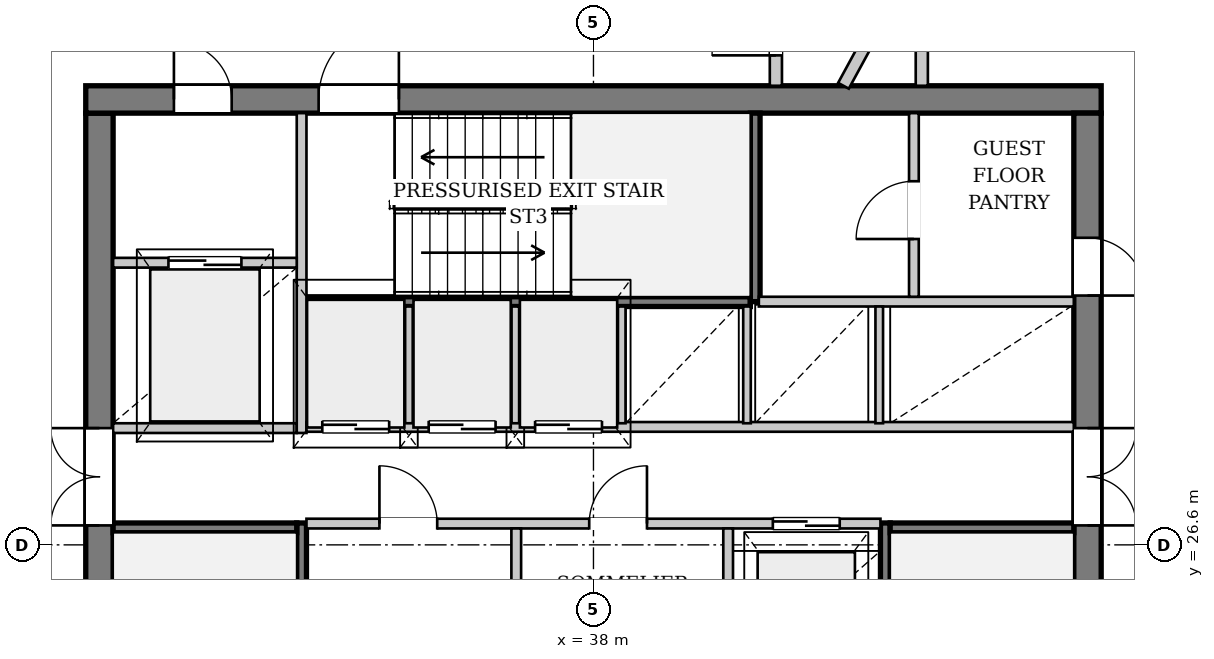
"""IFC4 building model, lengths in metres.
Left out: names, types, materials, properties, quantities, classifications, styles, units other than length and angle.
Written with IfcOpenShell. Run it as: python <this file> out.ifc"""

import sys

from ifc_helpers import new_model, si_unit, direction, frame, frame_2d, origin, place, context, subcontext, project, spatial, rectangle, extrude, source, transform, mapped, element, fill, save


model = new_model("IFC4")
c1 = context("Model", 3, precision=1e-05, world=origin(), true_north=direction((0.0, 1.0)))
c2 = subcontext(c1, "Body", "Model", "MODEL_VIEW")
j1 = project(units=[si_unit("LENGTHUNIT", "METRE"), si_unit("PLANEANGLEUNIT", "RADIAN")], contexts=[c1])
p1 = place(None, origin())
s1 = spatial("IfcSite", under=j1, at=p1, CompositionType="ELEMENT")
p2 = place(p1, origin())
s2 = spatial("IfcBuilding", under=s1, at=p2, CompositionType="ELEMENT")
p3 = place(p2, frame((0.0, 0.0, 245.3)))
s3 = spatial("IfcBuildingStorey", under=s2, at=p3, CompositionType="ELEMENT", Elevation=245.3)
p4 = place(p3, frame((15.593, 28.735, 0.0), z_axis=(0.0, 0.0, 1.0), x_axis=(0.841061212788, 0.54093995632, 0.0)))
e1 = element("IfcWall", 1, at=p4, inside=s3, PredefinedType="SOLIDWALL", context=c2, shape_type="SweptSolid", body=[
    extrude(rectangle(XDim=22.124, YDim=0.38, at=frame_2d((11.062, 0.0))), origin(), (0.0, 0.0, 1.0), 2.872),
])
p5 = place(p4, frame((5.595, 0.0, 0.65)))
e2 = element("IfcOpeningElement", 2, at=p5, cuts=e1, PredefinedType="OPENING", context=c2, shape_type="SweptSolid", body=[
    extrude(rectangle(XDim=1.2, YDim=1.5, at=frame_2d((0.6, 0.75))), frame((0.0, 0.2, 0.0), z_axis=(0.0, -1.0, 0.0), x_axis=(1.0, 0.0, 0.0)), (0.0, 0.0, 1.0), 0.4),
])
p6 = place(p4, frame((16.929, 0.0, 0.65)))
e3 = element("IfcOpeningElement", 3, at=p6, cuts=e1, PredefinedType="OPENING", context=c2, shape_type="SweptSolid", body=[
    extrude(rectangle(XDim=1.2, YDim=1.5, at=frame_2d((0.6, 0.75))), frame((0.0, 0.2, 0.0), z_axis=(0.0, -1.0, 0.0), x_axis=(1.0, 0.0, 0.0)), (0.0, 0.0, 1.0), 0.4),
])
p7 = place(p3, frame((29.875, 19.5, 0.0), z_axis=(0.0, 0.0, 1.0), x_axis=(0.0, 1.0, 0.0)))
e4 = element("IfcWall", 4, at=p7, inside=s3, PredefinedType="SHEAR", context=c2, shape_type="SweptSolid", body=[
    extrude(rectangle(XDim=14.2, YDim=0.45, at=frame_2d((7.1, 0.0))), origin(), (0.0, 0.0, 1.0), 3.38),
])
p8 = place(p7, frame((7.42, 0.0, 0.0)))
e5 = element("IfcOpeningElement", 5, at=p8, cuts=e4, PredefinedType="OPENING", context=c2, shape_type="SweptSolid", body=[
    extrude(rectangle(XDim=1.6, YDim=2.2, at=frame_2d((0.8, 1.1))), frame((0.0, 0.235, 0.0), z_axis=(0.0, -1.0, 0.0), x_axis=(1.0, 0.0, 0.0)), (0.0, 0.0, 1.0), 0.47),
])
p9 = place(p3, frame((29.65, 33.925, 0.0), z_axis=(0.0, 0.0, 1.0), x_axis=(1.0, 0.0, 0.0)))
e6 = element("IfcWall", 6, at=p9, inside=s3, PredefinedType="SHEAR", context=c2, shape_type="SweptSolid", body=[
    extrude(rectangle(XDim=16.7, YDim=0.45, at=frame_2d((8.35, 0.0))), origin(), (0.0, 0.0, 1.0), 3.38),
])
p10 = place(p9, frame((1.45, 0.0, 0.0)))
e7 = element("IfcOpeningElement", 7, at=p10, cuts=e6, PredefinedType="OPENING", context=c2, shape_type="SweptSolid", body=[
    extrude(rectangle(XDim=0.95, YDim=2.1, at=frame_2d((0.475, 1.05))), frame((0.0, 0.235, 0.0), z_axis=(0.0, -1.0, 0.0), x_axis=(1.0, 0.0, 0.0)), (0.0, 0.0, 1.0), 0.47),
])
p11 = place(p9, frame((3.83, 0.0, 0.0)))
e8 = element("IfcOpeningElement", 8, at=p11, cuts=e6, PredefinedType="OPENING", context=c2, shape_type="SweptSolid", body=[
    extrude(rectangle(XDim=1.32, YDim=2.2, at=frame_2d((0.66, 1.1))), frame((0.0, 0.235, 0.0), z_axis=(0.0, -1.0, 0.0), x_axis=(1.0, 0.0, 0.0)), (0.0, 0.0, 1.0), 0.47),
])
p12 = place(p3, frame((46.125, 33.7, 0.0), z_axis=(0.0, 0.0, 1.0), x_axis=(0.0, -1.0, 0.0)))
e9 = element("IfcWall", 9, at=p12, inside=s3, PredefinedType="SHEAR", context=c2, shape_type="SweptSolid", body=[
    extrude(rectangle(XDim=14.2, YDim=0.45, at=frame_2d((7.1, 0.0))), origin(), (0.0, 0.0, 1.0), 3.38),
])
p13 = place(p12, frame((5.18, 0.0, 0.0)))
e10 = element("IfcOpeningElement", 10, at=p13, cuts=e9, PredefinedType="OPENING", context=c2, shape_type="SweptSolid", body=[
    extrude(rectangle(XDim=1.6, YDim=2.2, at=frame_2d((0.8, 1.1))), frame((0.0, 0.235, 0.0), z_axis=(0.0, -1.0, 0.0), x_axis=(1.0, 0.0, 0.0)), (0.0, 0.0, 1.0), 0.47),
])
p14 = place(p12, frame((2.05, 0.0, 0.0)))
e11 = element("IfcOpeningElement", 11, at=p14, cuts=e9, PredefinedType="OPENING", context=c2, shape_type="SweptSolid", body=[
    extrude(rectangle(XDim=0.95, YDim=2.1, at=frame_2d((0.475, 1.05))), frame((0.0, 0.235, 0.0), z_axis=(0.0, -1.0, 0.0), x_axis=(1.0, 0.0, 0.0)), (0.0, 0.0, 1.0), 0.47),
])
p15 = place(p3, frame((33.2, 19.5, 0.0), z_axis=(0.0, 0.0, 1.0), x_axis=(0.0, 1.0, 0.0)))
e12 = element("IfcWall", 12, at=p15, inside=s3, PredefinedType="PARTITIONING", context=c2, shape_type="SweptSolid", body=[
    extrude(rectangle(XDim=7.46, YDim=0.16, at=frame_2d((3.73, 0.0))), origin(), (0.0, 0.0, 1.0), 3.38),
])
p16 = place(p15, frame((0.08, 0.0, 0.0)))
e13 = element("IfcOpeningElement", 13, at=p16, cuts=e12, PredefinedType="OPENING", context=c2, shape_type="SweptSolid", body=[
    extrude(rectangle(XDim=1.32, YDim=2.2, at=frame_2d((0.66, 1.1))), frame((0.0, 0.09, 0.0), z_axis=(0.0, -1.0, 0.0), x_axis=(1.0, 0.0, 0.0)), (0.0, 0.0, 1.0), 0.18),
])
p17 = place(p3, frame((30.1, 26.88, 0.0), z_axis=(0.0, 0.0, 1.0), x_axis=(1.0, 0.0, 0.0)))
e14 = element("IfcWall", 14, at=p17, inside=s3, PredefinedType="PARTITIONING", context=c2, shape_type="SweptSolid", body=[
    extrude(rectangle(XDim=3.02, YDim=0.16, at=frame_2d((1.51, 0.0))), origin(), (0.0, 0.0, 1.0), 3.38),
])
p18 = place(p3, frame((42.8, 26.96, 0.0), z_axis=(0.0, 0.0, 1.0), x_axis=(0.0, -1.0, 0.0)))
e15 = element("IfcWall", 15, at=p18, inside=s3, PredefinedType="PARTITIONING", context=c2, shape_type="SweptSolid", body=[
    extrude(rectangle(XDim=7.46, YDim=0.16, at=frame_2d((3.73, 0.0))), origin(), (0.0, 0.0, 1.0), 3.38),
])
p19 = place(p18, frame((6.06, 0.0, 0.0)))
e16 = element("IfcOpeningElement", 16, at=p19, cuts=e15, PredefinedType="OPENING", context=c2, shape_type="SweptSolid", body=[
    extrude(rectangle(XDim=1.32, YDim=2.2, at=frame_2d((0.66, 1.1))), frame((0.0, 0.09, 0.0), z_axis=(0.0, -1.0, 0.0), x_axis=(1.0, 0.0, 0.0)), (0.0, 0.0, 1.0), 0.18),
])
p20 = place(p3, frame((42.88, 26.88, 0.0), z_axis=(0.0, 0.0, 1.0), x_axis=(1.0, 0.0, 0.0)))
e17 = element("IfcWall", 17, at=p20, inside=s3, PredefinedType="PARTITIONING", context=c2, shape_type="SweptSolid", body=[
    extrude(rectangle(XDim=3.02, YDim=0.16, at=frame_2d((1.51, 0.0))), origin(), (0.0, 0.0, 1.0), 3.38),
])
p21 = place(p3, frame((33.28, 30.6, 0.0), z_axis=(0.0, 0.0, 1.0), x_axis=(1.0, 0.0, 0.0)))
e18 = element("IfcWall", 18, at=p21, inside=s3, PredefinedType="PARTITIONING", context=c2, shape_type="SweptSolid", body=[
    extrude(rectangle(XDim=7.3, YDim=0.16, at=frame_2d((3.65, 0.0))), origin(), (0.0, 0.0, 1.0), 3.38),
])
p22 = place(p3, frame((40.66, 30.6, 0.0), z_axis=(0.0, 0.0, 1.0), x_axis=(0.0, 1.0, 0.0)))
e19 = element("IfcWall", 19, at=p22, inside=s3, PredefinedType="PARTITIONING", context=c2, shape_type="SweptSolid", body=[
    extrude(rectangle(XDim=3.1, YDim=0.16, at=frame_2d((1.55, 0.0))), origin(), (0.0, 0.0, 1.0), 3.38),
])
p23 = place(p3, frame((30.1, 28.52, 0.0), z_axis=(0.0, 0.0, 1.0), x_axis=(1.0, 0.0, 0.0)))
e20 = element("IfcWall", 20, at=p23, inside=s3, PredefinedType="PARTITIONING", context=c2, shape_type="SweptSolid", body=[
    extrude(rectangle(XDim=3.02, YDim=0.16, at=frame_2d((1.51, 0.0))), origin(), (0.0, 0.0, 1.0), 3.38),
])
p24 = place(p3, frame((33.2, 28.44, 0.0), z_axis=(0.0, 0.0, 1.0), x_axis=(0.0, 1.0, 0.0)))
e21 = element("IfcWall", 21, at=p24, inside=s3, PredefinedType="PARTITIONING", context=c2, shape_type="SweptSolid", body=[
    extrude(rectangle(XDim=5.26, YDim=0.16, at=frame_2d((2.63, 0.0))), origin(), (0.0, 0.0, 1.0), 3.38),
])
p25 = place(p3, frame((30.1, 31.24, 0.0), z_axis=(0.0, 0.0, 1.0), x_axis=(1.0, 0.0, 0.0)))
e22 = element("IfcWall", 22, at=p25, inside=s3, PredefinedType="PARTITIONING", context=c2, shape_type="SweptSolid", body=[
    extrude(rectangle(XDim=3.02, YDim=0.16, at=frame_2d((1.51, 0.0))), origin(), (0.0, 0.0, 1.0), 3.38),
])
p26 = place(p25, frame((0.91, 0.0, 0.0)))
e23 = element("IfcOpeningElement", 23, at=p26, cuts=e22, PredefinedType="OPENING", context=c2, shape_type="SweptSolid", body=[
    extrude(rectangle(XDim=1.2, YDim=2.2, at=frame_2d((0.6, 1.1))), frame((0.0, 0.09, 0.0), z_axis=(0.0, -1.0, 0.0), x_axis=(1.0, 0.0, 0.0)), (0.0, 0.0, 1.0), 0.18),
])
p27 = place(p3, frame((33.28, 26.95, 0.0), z_axis=(0.0, 0.0, 1.0), x_axis=(1.0, 0.0, 0.0)))
e24 = element("IfcWall", 24, at=p27, inside=s3, PredefinedType="PARTITIONING", context=c2, shape_type="SweptSolid", body=[
    extrude(rectangle(XDim=9.44, YDim=0.16, at=frame_2d((4.72, 0.0))), origin(), (0.0, 0.0, 1.0), 3.38),
])
p28 = place(p27, frame((1.2, 0.0, 0.0)))
e25 = element("IfcOpeningElement", 25, at=p28, cuts=e24, PredefinedType="OPENING", context=c2, shape_type="SweptSolid", body=[
    extrude(rectangle(XDim=0.95, YDim=2.1, at=frame_2d((0.475, 1.05))), frame((0.0, 0.09, 0.0), z_axis=(0.0, -1.0, 0.0), x_axis=(1.0, 0.0, 0.0)), (0.0, 0.0, 1.0), 0.18),
])
p29 = place(p27, frame((4.65, 0.0, 0.0)))
e26 = element("IfcOpeningElement", 26, at=p29, cuts=e24, PredefinedType="OPENING", context=c2, shape_type="SweptSolid", body=[
    extrude(rectangle(XDim=0.95, YDim=2.1, at=frame_2d((0.475, 1.05))), frame((0.0, 0.09, 0.0), z_axis=(0.0, -1.0, 0.0), x_axis=(1.0, 0.0, 0.0)), (0.0, 0.0, 1.0), 0.18),
])
p30 = place(p27, frame((7.67, 0.0, 0.0)))
e27 = element("IfcOpeningElement", 27, at=p30, cuts=e24, PredefinedType="OPENING", context=c2, shape_type="SweptSolid", body=[
    extrude(rectangle(XDim=1.1, YDim=2.2, at=frame_2d((0.55, 1.1))), frame((0.0, 0.09, 0.0), z_axis=(0.0, -1.0, 0.0), x_axis=(1.0, 0.0, 0.0)), (0.0, 0.0, 1.0), 0.18),
])
for number, where, z_axis, x_axis in (
    (28, (36.73, 24.56, 0.0), (0.0, 0.0, 1.0), (0.0, 1.0, 0.0)),
    (29, (40.215, 24.56, 0.0), (0.0, 0.0, 1.0), (0.0, 1.0, 0.0)),
):
    element("IfcWall", number, at=place(p3, frame(where, z_axis=z_axis, x_axis=x_axis)), inside=s3, PredefinedType="PARTITIONING", context=c2, shape_type="SweptSolid", body=[
        extrude(rectangle(XDim=2.31, YDim=0.16, at=frame_2d((1.155, 0.0))), origin(), (0.0, 0.0, 1.0), 3.38),
    ])
p31 = place(p3, frame((33.28, 28.54, 0.0), z_axis=(0.0, 0.0, 1.0), x_axis=(1.0, 0.0, 0.0)))
e30 = element("IfcWall", 30, at=p31, inside=s3, PredefinedType="PARTITIONING", context=c2, shape_type="SweptSolid", body=[
    extrude(rectangle(XDim=12.62, YDim=0.16, at=frame_2d((6.31, 0.0))), origin(), (0.0, 0.0, 1.0), 3.38),
])
p32 = place(p31, frame((0.26, 0.0, 0.0)))
e31 = element("IfcOpeningElement", 31, at=p32, cuts=e30, PredefinedType="OPENING", context=c2, shape_type="SweptSolid", body=[
    extrude(rectangle(XDim=1.1, YDim=2.2, at=frame_2d((0.55, 1.1))), frame((0.0, 0.09, 0.0), z_axis=(0.0, -1.0, 0.0), x_axis=(1.0, 0.0, 0.0)), (0.0, 0.0, 1.0), 0.18),
])
p33 = place(p31, frame((2.01, 0.0, 0.0)))
e32 = element("IfcOpeningElement", 32, at=p33, cuts=e30, PredefinedType="OPENING", context=c2, shape_type="SweptSolid", body=[
    extrude(rectangle(XDim=1.1, YDim=2.2, at=frame_2d((0.55, 1.1))), frame((0.0, 0.09, 0.0), z_axis=(0.0, -1.0, 0.0), x_axis=(1.0, 0.0, 0.0)), (0.0, 0.0, 1.0), 0.18),
])
p34 = place(p31, frame((3.76, 0.0, 0.0)))
e33 = element("IfcOpeningElement", 33, at=p34, cuts=e30, PredefinedType="OPENING", context=c2, shape_type="SweptSolid", body=[
    extrude(rectangle(XDim=1.1, YDim=2.2, at=frame_2d((0.55, 1.1))), frame((0.0, 0.09, 0.0), z_axis=(0.0, -1.0, 0.0), x_axis=(1.0, 0.0, 0.0)), (0.0, 0.0, 1.0), 0.18),
])
p35 = place(p3, frame((40.72, 30.6, 0.0), z_axis=(0.0, 0.0, 1.0), x_axis=(1.0, 0.0, 0.0)))
e34 = element("IfcWall", 34, at=p35, inside=s3, PredefinedType="PARTITIONING", context=c2, shape_type="SweptSolid", body=[
    extrude(rectangle(XDim=5.18, YDim=0.16, at=frame_2d((2.59, 0.0))), origin(), (0.0, 0.0, 1.0), 3.38),
])
for number, where, z_axis, x_axis in (
    (35, (34.965, 28.6, 0.0), (0.0, 0.0, 1.0), (0.0, 1.0, 0.0)),
    (36, (36.715, 28.6, 0.0), (0.0, 0.0, 1.0), (0.0, 1.0, 0.0)),
    (37, (38.465, 28.6, 0.0), (0.0, 0.0, 1.0), (0.0, 1.0, 0.0)),
    (38, (40.525, 28.6, 0.0), (0.0, 0.0, 1.0), (0.0, 1.0, 0.0)),
    (39, (42.7, 28.6, 0.0), (0.0, 0.0, 1.0), (0.0, 1.0, 0.0)),
):
    element("IfcWall", number, at=place(p3, frame(where, z_axis=z_axis, x_axis=x_axis)), inside=s3, PredefinedType="PARTITIONING", context=c2, shape_type="SweptSolid", body=[
        extrude(rectangle(XDim=1.92, YDim=0.125, at=frame_2d((0.96, 0.0))), origin(), (0.0, 0.0, 1.0), 3.38),
    ])
p36 = place(p3, frame((43.27, 30.68, 0.0), z_axis=(0.0, 0.0, 1.0), x_axis=(0.0, 1.0, 0.0)))
e40 = element("IfcWall", 40, at=p36, inside=s3, PredefinedType="PARTITIONING", context=c2, shape_type="SweptSolid", body=[
    extrude(rectangle(XDim=3.02, YDim=0.16, at=frame_2d((1.51, 0.0))), origin(), (0.0, 0.0, 1.0), 3.38),
])
p37 = place(p36, frame((0.95, 0.0, 0.0)))
e41 = element("IfcOpeningElement", 41, at=p37, cuts=e40, PredefinedType="OPENING", context=c2, shape_type="SweptSolid", body=[
    extrude(rectangle(XDim=0.95, YDim=2.1, at=frame_2d((0.475, 1.05))), frame((0.0, 0.09, 0.0), z_axis=(0.0, -1.0, 0.0), x_axis=(1.0, 0.0, 0.0)), (0.0, 0.0, 1.0), 0.18),
])
p38 = place(p3, frame((42.112, 34.15, 0.0), z_axis=(0.0, 0.0, 1.0), x_axis=(0.478252978847, 0.878222117817, 0.0)))
e42 = element("IfcWall", 42, at=p38, inside=s3, PredefinedType="PARTITIONING", context=c2, shape_type="SweptSolid", body=[
    extrude(rectangle(XDim=14.82, YDim=0.2, at=frame_2d((7.41, 0.0))), origin(), (0.0, 0.0, 1.0), 3.38),
])
p39 = place(p3, frame((41.0, 34.15, 0.0), z_axis=(0.0, 0.0, 1.0), x_axis=(0.0, 1.0, 0.0)))
e43 = element("IfcWall", 43, at=p39, inside=s3, PredefinedType="PARTITIONING", context=c2, shape_type="SweptSolid", body=[
    extrude(rectangle(XDim=1.85, YDim=0.2, at=frame_2d((0.925, 0.0))), origin(), (0.0, 0.0, 1.0), 3.38),
])
p40 = place(p39, frame((0.5, 0.0, 0.0)))
e44 = element("IfcOpeningElement", 44, at=p40, cuts=e43, PredefinedType="OPENING", context=c2, shape_type="SweptSolid", body=[
    extrude(rectangle(XDim=1.05, YDim=2.2, at=frame_2d((0.525, 1.1))), frame((0.0, 0.11, 0.0), z_axis=(0.0, -1.0, 0.0), x_axis=(1.0, 0.0, 0.0)), (0.0, 0.0, 1.0), 0.22),
])
p41 = place(p3, frame((43.4, 34.15, 0.0), z_axis=(0.0, 0.0, 1.0), x_axis=(0.0, 1.0, 0.0)))
e45 = element("IfcWall", 45, at=p41, inside=s3, PredefinedType="PARTITIONING", context=c2, shape_type="SweptSolid", body=[
    extrude(rectangle(XDim=1.85, YDim=0.2, at=frame_2d((0.925, 0.0))), origin(), (0.0, 0.0, 1.0), 3.38),
])
m1 = source(origin(), c2, "Body", "SweptSolid", [
    extrude(rectangle(XDim=1.6, YDim=2.2, at=frame_2d((0.8, 1.1))), frame((0.0, 0.025, 0.0), z_axis=(0.0, -1.0, 0.0), x_axis=(1.0, 0.0, 0.0)), (0.0, 0.0, 1.0), 0.05),
])
p42 = place(p8, origin())
e46 = element("IfcDoor", 46, at=p42, inside=s3, OperationType="DOUBLE_DOOR_SINGLE_SWING", PredefinedType="DOOR", context=c2, shape_type="MappedRepresentation", body=[
    mapped(m1, transform((0.0, 0.0, 0.0), x_axis=(1.0, 0.0, 0.0), y_axis=(0.0, 1.0, 0.0), z_axis=(0.0, 0.0, 1.0), scale=1.0)),
])
fill(e5, e46)
m2 = source(origin(), c2, "Body", "SweptSolid", [
    extrude(rectangle(XDim=0.95, YDim=2.1, at=frame_2d((0.475, 1.05))), frame((0.0, 0.025, 0.0), z_axis=(0.0, -1.0, 0.0), x_axis=(1.0, 0.0, 0.0)), (0.0, 0.0, 1.0), 0.05),
])
p43 = place(p10, origin())
e47 = element("IfcDoor", 47, at=p43, inside=s3, OperationType="SINGLE_SWING_LEFT", PredefinedType="DOOR", context=c2, shape_type="MappedRepresentation", body=[
    mapped(m2, transform((0.0, 0.0, 0.0), x_axis=(1.0, 0.0, 0.0), y_axis=(0.0, 1.0, 0.0), z_axis=(0.0, 0.0, 1.0), scale=1.0)),
])
fill(e7, e47)
m3 = source(origin(), c2, "Body", "SweptSolid", [
    extrude(rectangle(XDim=1.32, YDim=2.2, at=frame_2d((0.66, 1.1))), frame((0.0, 0.025, 0.0), z_axis=(0.0, -1.0, 0.0), x_axis=(1.0, 0.0, 0.0)), (0.0, 0.0, 1.0), 0.05),
])
p44 = place(p11, origin())
e48 = element("IfcDoor", 48, at=p44, inside=s3, OperationType="SINGLE_SWING_RIGHT", PredefinedType="DOOR", context=c2, shape_type="MappedRepresentation", body=[
    mapped(m3, transform((0.0, 0.0, 0.0), x_axis=(1.0, 0.0, 0.0), y_axis=(0.0, 1.0, 0.0), z_axis=(0.0, 0.0, 1.0), scale=1.0)),
])
fill(e8, e48)
p45 = place(p13, origin())
e49 = element("IfcDoor", 49, at=p45, inside=s3, OperationType="DOUBLE_DOOR_SINGLE_SWING", PredefinedType="DOOR", context=c2, shape_type="MappedRepresentation", body=[
    mapped(m1, transform((0.0, 0.0, 0.0), x_axis=(1.0, 0.0, 0.0), y_axis=(0.0, 1.0, 0.0), z_axis=(0.0, 0.0, 1.0), scale=1.0)),
])
fill(e10, e49)
m4 = source(origin(), c2, "Body", "SweptSolid", [
    extrude(rectangle(XDim=1.2, YDim=2.2, at=frame_2d((0.6, 1.1))), frame((0.0, 0.025, 0.0), z_axis=(0.0, -1.0, 0.0), x_axis=(1.0, 0.0, 0.0)), (0.0, 0.0, 1.0), 0.05),
])
p46 = place(p26, origin())
e50 = element("IfcDoor", 50, at=p46, inside=s3, OperationType="DOUBLE_DOOR_SLIDING", PredefinedType="DOOR", context=c2, shape_type="MappedRepresentation", body=[
    mapped(m4, transform((0.0, 0.0, 0.0), x_axis=(1.0, 0.0, 0.0), y_axis=(0.0, 1.0, 0.0), z_axis=(0.0, 0.0, 1.0), scale=1.0)),
])
fill(e23, e50)
p47 = place(p28, origin())
e51 = element("IfcDoor", 51, at=p47, inside=s3, OperationType="SINGLE_SWING_LEFT", PredefinedType="DOOR", context=c2, shape_type="MappedRepresentation", body=[
    mapped(m2, transform((0.0, 0.0, 0.0), x_axis=(1.0, 0.0, 0.0), y_axis=(0.0, 1.0, 0.0), z_axis=(0.0, 0.0, 1.0), scale=1.0)),
])
fill(e25, e51)
p48 = place(p29, origin())
e52 = element("IfcDoor", 52, at=p48, inside=s3, OperationType="SINGLE_SWING_RIGHT", PredefinedType="DOOR", context=c2, shape_type="MappedRepresentation", body=[
    mapped(m2, transform((0.0, 0.0, 0.0), x_axis=(1.0, 0.0, 0.0), y_axis=(0.0, 1.0, 0.0), z_axis=(0.0, 0.0, 1.0), scale=1.0)),
])
fill(e26, e52)
m5 = source(origin(), c2, "Body", "SweptSolid", [
    extrude(rectangle(XDim=1.1, YDim=2.2, at=frame_2d((0.55, 1.1))), frame((0.0, 0.025, 0.0), z_axis=(0.0, -1.0, 0.0), x_axis=(1.0, 0.0, 0.0)), (0.0, 0.0, 1.0), 0.05),
])
p49 = place(p30, origin())
e53 = element("IfcDoor", 53, at=p49, inside=s3, OperationType="DOUBLE_DOOR_SLIDING", PredefinedType="DOOR", context=c2, shape_type="MappedRepresentation", body=[
    mapped(m5, transform((0.0, 0.0, 0.0), x_axis=(1.0, 0.0, 0.0), y_axis=(0.0, 1.0, 0.0), z_axis=(0.0, 0.0, 1.0), scale=1.0)),
])
fill(e27, e53)
p50 = place(p32, origin())
e54 = element("IfcDoor", 54, at=p50, inside=s3, OperationType="DOUBLE_DOOR_SLIDING", PredefinedType="DOOR", context=c2, shape_type="MappedRepresentation", body=[
    mapped(m5, transform((0.0, 0.0, 0.0), x_axis=(1.0, 0.0, 0.0), y_axis=(0.0, 1.0, 0.0), z_axis=(0.0, 0.0, 1.0), scale=1.0)),
])
fill(e31, e54)
p51 = place(p33, origin())
e55 = element("IfcDoor", 55, at=p51, inside=s3, OperationType="DOUBLE_DOOR_SLIDING", PredefinedType="DOOR", context=c2, shape_type="MappedRepresentation", body=[
    mapped(m5, transform((0.0, 0.0, 0.0), x_axis=(1.0, 0.0, 0.0), y_axis=(0.0, 1.0, 0.0), z_axis=(0.0, 0.0, 1.0), scale=1.0)),
])
fill(e32, e55)
p52 = place(p34, origin())
e56 = element("IfcDoor", 56, at=p52, inside=s3, OperationType="DOUBLE_DOOR_SLIDING", PredefinedType="DOOR", context=c2, shape_type="MappedRepresentation", body=[
    mapped(m5, transform((0.0, 0.0, 0.0), x_axis=(1.0, 0.0, 0.0), y_axis=(0.0, 1.0, 0.0), z_axis=(0.0, 0.0, 1.0), scale=1.0)),
])
fill(e33, e56)
p53 = place(p37, origin())
e57 = element("IfcDoor", 57, at=p53, inside=s3, OperationType="SINGLE_SWING_LEFT", PredefinedType="DOOR", context=c2, shape_type="MappedRepresentation", body=[
    mapped(m2, transform((0.0, 0.0, 0.0), x_axis=(1.0, 0.0, 0.0), y_axis=(0.0, 1.0, 0.0), z_axis=(0.0, 0.0, 1.0), scale=1.0)),
])
fill(e41, e57)
p54 = place(p14, origin())
e58 = element("IfcDoor", 58, at=p54, inside=s3, OperationType="SINGLE_SWING_RIGHT", PredefinedType="DOOR", context=c2, shape_type="MappedRepresentation", body=[
    mapped(m2, transform((0.0, 0.0, 0.0), x_axis=(1.0, 0.0, 0.0), y_axis=(0.0, 1.0, 0.0), z_axis=(0.0, 0.0, 1.0), scale=1.0)),
])
fill(e11, e58)
m6 = source(origin(), c2, "Body", "SweptSolid", [
    extrude(rectangle(XDim=1.05, YDim=2.2, at=frame_2d((0.525, 1.1))), frame((0.0, 0.025, 0.0), z_axis=(0.0, -1.0, 0.0), x_axis=(1.0, 0.0, 0.0)), (0.0, 0.0, 1.0), 0.05),
])
p55 = place(p40, origin())
e59 = element("IfcDoor", 59, at=p55, inside=s3, OperationType="SINGLE_SWING_LEFT", PredefinedType="DOOR", context=c2, shape_type="MappedRepresentation", body=[
    mapped(m6, transform((0.0, 0.0, 0.0), x_axis=(1.0, 0.0, 0.0), y_axis=(0.0, 1.0, 0.0), z_axis=(0.0, 0.0, 1.0), scale=1.0)),
])
fill(e44, e59)
save(model, sys.argv[1])
